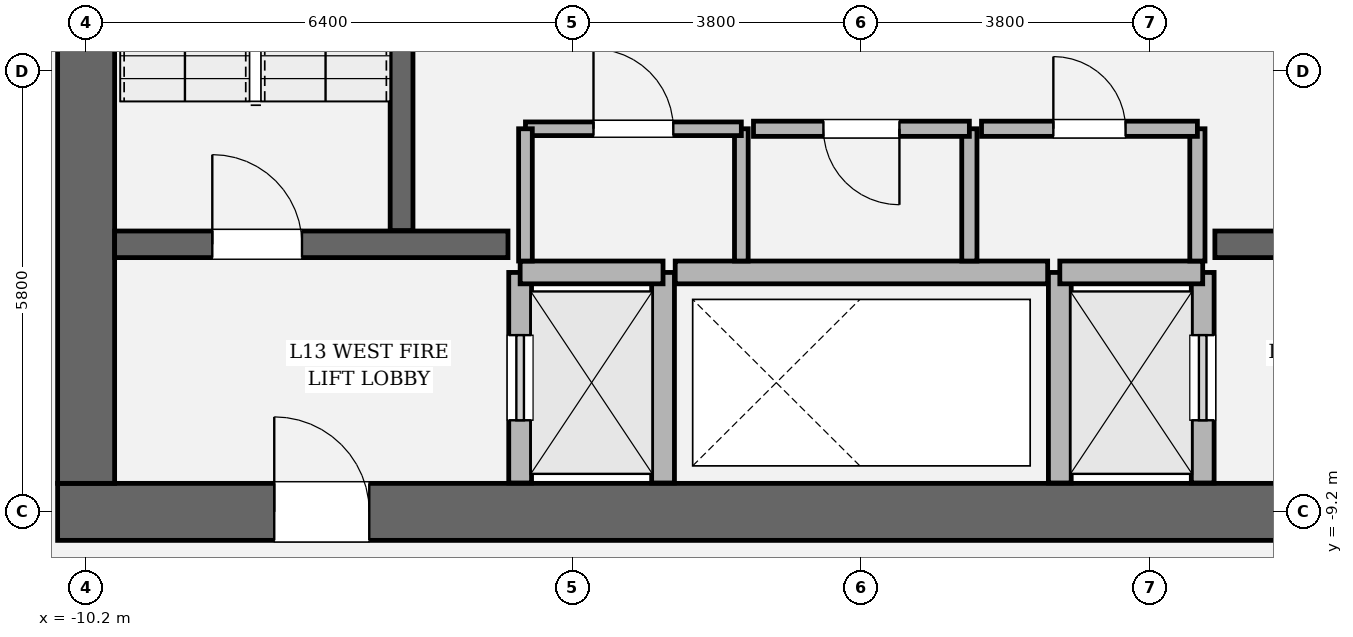
"""IFC4 building model, lengths in metres.
Left out: names, types, materials, properties, quantities, classifications, styles, units other than length and angle.
Written with IfcOpenShell. Run it as: python <this file> out.ifc"""

import sys

from ifc_helpers import new_model, si_unit, direction, frame, frame_2d, origin, place, context, subcontext, project, spatial, rectangle, extrude, element, fill, save


model = new_model("IFC4")
c1 = context("Model", 3, precision=1e-05, world=origin(), true_north=direction((0.0, 1.0)))
c2 = subcontext(c1, "Body", "Model", "MODEL_VIEW")
j1 = project(units=[si_unit("LENGTHUNIT", "METRE"), si_unit("PLANEANGLEUNIT", "RADIAN")], contexts=[c1])
p1 = place(None, origin())
s1 = spatial("IfcSite", under=j1, at=p1, CompositionType="ELEMENT")
p2 = place(p1, origin())
s2 = spatial("IfcBuilding", under=s1, at=p2, CompositionType="ELEMENT")
p3 = place(p2, frame((0.0, 0.0, 60.6)))
s3 = spatial("IfcBuildingStorey", under=s2, at=p3, CompositionType="ELEMENT", Elevation=60.6)
p4 = place(p3, frame((10.575, -9.2, 0.0), z_axis=(0.0, 0.0, 1.0), x_axis=(-1.0, 0.0, 0.0)))
e1 = element("IfcWall", 1, at=p4, inside=s3, PredefinedType="SHEAR", context=c2, shape_type="SweptSolid", body=[
    extrude(rectangle(XDim=21.15, YDim=0.75, at=frame_2d((10.575, 0.0))), origin(), (0.0, 0.0, 1.0), 4.05),
])
p5 = place(p4, frame((2.85, 0.0, 0.0)))
e2 = element("IfcOpeningElement", 2, at=p5, cuts=e1, PredefinedType="OPENING", context=c2, shape_type="SweptSolid", body=[
    extrude(rectangle(XDim=1.25, YDim=2.25, at=frame_2d((0.625, 1.125))), frame((0.0, 0.385, 0.0), z_axis=(0.0, -1.0, 0.0), x_axis=(1.0, 0.0, 0.0)), (0.0, 0.0, 1.0), 0.77),
])
p6 = place(p4, frame((17.05, 0.0, 0.0)))
e3 = element("IfcOpeningElement", 3, at=p6, cuts=e1, PredefinedType="OPENING", context=c2, shape_type="SweptSolid", body=[
    extrude(rectangle(XDim=1.25, YDim=2.25, at=frame_2d((0.625, 1.125))), frame((0.0, 0.385, 0.0), z_axis=(0.0, -1.0, 0.0), x_axis=(1.0, 0.0, 0.0)), (0.0, 0.0, 1.0), 0.77),
])
p7 = place(p3, frame((-10.2, -8.825, 0.0), z_axis=(0.0, 0.0, 1.0), x_axis=(0.0, 1.0, 0.0)))
e4 = element("IfcWall", 4, at=p7, inside=s3, PredefinedType="SHEAR", context=c2, shape_type="SweptSolid", body=[
    extrude(rectangle(XDim=17.65, YDim=0.75, at=frame_2d((8.825, 0.0))), origin(), (0.0, 0.0, 1.0), 4.05),
])
p8 = place(p7, frame((12.615, 0.0, 0.0)))
e5 = element("IfcOpeningElement", 5, at=p8, cuts=e4, PredefinedType="OPENING", context=c2, shape_type="SweptSolid", body=[
    extrude(rectangle(XDim=1.18, YDim=2.2, at=frame_2d((0.59, 1.1))), frame((0.0, 0.385, 0.0), z_axis=(0.0, -1.0, 0.0), x_axis=(1.0, 0.0, 0.0)), (0.0, 0.0, 1.0), 0.77),
])
p9 = place(p3, frame((-6.05, -5.5, 0.0), z_axis=(0.0, 0.0, 1.0), x_axis=(0.0, 1.0, 0.0)))
e6 = element("IfcWall", 6, at=p9, inside=s3, PredefinedType="SOLIDWALL", context=c2, shape_type="SweptSolid", body=[
    extrude(rectangle(XDim=8.95, YDim=0.3, at=frame_2d((4.475, 0.0))), origin(), (0.0, 0.0, 1.0), 4.05),
])
p10 = place(p3, frame((-9.825, -5.68, 0.0), z_axis=(0.0, 0.0, 1.0), x_axis=(1.0, 0.0, 0.0)))
e7 = element("IfcWall", 7, at=p10, inside=s3, PredefinedType="SOLIDWALL", context=c2, shape_type="SweptSolid", body=[
    extrude(rectangle(XDim=5.175, YDim=0.35, at=frame_2d((2.587, 0.0))), origin(), (0.0, 0.0, 1.0), 4.05),
])
p11 = place(p10, frame((1.285, 0.0, 0.0)))
e8 = element("IfcOpeningElement", 8, at=p11, cuts=e7, PredefinedType="OPENING", context=c2, shape_type="SweptSolid", body=[
    extrude(rectangle(XDim=1.18, YDim=2.2, at=frame_2d((0.59, 1.1))), frame((0.0, 0.185, 0.0), z_axis=(0.0, -1.0, 0.0), x_axis=(1.0, 0.0, 0.0)), (0.0, 0.0, 1.0), 0.37),
])
p12 = place(p3, frame((4.65, -5.68, 0.0), z_axis=(0.0, 0.0, 1.0), x_axis=(1.0, 0.0, 0.0)))
e9 = element("IfcWall", 9, at=p12, inside=s3, PredefinedType="SOLIDWALL", context=c2, shape_type="SweptSolid", body=[
    extrude(rectangle(XDim=5.175, YDim=0.35, at=frame_2d((2.587, 0.0))), origin(), (0.0, 0.0, 1.0), 4.05),
])
p13 = place(p12, frame((2.71, 0.0, 0.0)))
e10 = element("IfcOpeningElement", 10, at=p13, cuts=e9, PredefinedType="OPENING", context=c2, shape_type="SweptSolid", body=[
    extrude(rectangle(XDim=1.18, YDim=2.2, at=frame_2d((0.59, 1.1))), frame((0.0, 0.185, 0.0), z_axis=(0.0, -1.0, 0.0), x_axis=(1.0, 0.0, 0.0)), (0.0, 0.0, 1.0), 0.37),
])
p14 = place(p3, frame((-4.49, -8.82, 0.0), z_axis=(0.0, 0.0, 1.0), x_axis=(0.0, 1.0, 0.0)))
e11 = element("IfcWall", 11, at=p14, inside=s3, PredefinedType="SOLIDWALL", context=c2, shape_type="SweptSolid", body=[
    extrude(rectangle(XDim=2.77, YDim=0.3, at=frame_2d((1.385, 0.0))), origin(), (0.0, 0.0, 1.0), 3.81),
])
p15 = place(p14, frame((0.825, 0.0, 0.0)))
e12 = element("IfcOpeningElement", 12, at=p15, cuts=e11, PredefinedType="OPENING", context=c2, shape_type="SweptSolid", body=[
    extrude(rectangle(XDim=1.12, YDim=2.25, at=frame_2d((0.56, 1.125))), frame((0.0, 0.16, 0.0), z_axis=(0.0, -1.0, 0.0), x_axis=(1.0, 0.0, 0.0)), (0.0, 0.0, 1.0), 0.32),
])
p16 = place(p3, frame((-2.61, -8.82, 0.0), z_axis=(0.0, 0.0, 1.0), x_axis=(0.0, 1.0, 0.0)))
e13 = element("IfcWall", 13, at=p16, inside=s3, PredefinedType="SOLIDWALL", context=c2, shape_type="SweptSolid", body=[
    extrude(rectangle(XDim=2.77, YDim=0.3, at=frame_2d((1.385, 0.0))), origin(), (0.0, 0.0, 1.0), 3.81),
])
p17 = place(p3, frame((-4.49, -6.05, 0.0), z_axis=(0.0, 0.0, 1.0), x_axis=(1.0, 0.0, 0.0)))
e14 = element("IfcWall", 14, at=p17, inside=s3, PredefinedType="SOLIDWALL", context=c2, shape_type="SweptSolid", body=[
    extrude(rectangle(XDim=1.88, YDim=0.3, at=frame_2d((0.94, 0.0))), origin(), (0.0, 0.0, 1.0), 3.81),
])
p18 = place(p3, frame((4.49, -8.82, 0.0), z_axis=(0.0, 0.0, 1.0), x_axis=(0.0, 1.0, 0.0)))
e15 = element("IfcWall", 15, at=p18, inside=s3, PredefinedType="SOLIDWALL", context=c2, shape_type="SweptSolid", body=[
    extrude(rectangle(XDim=2.77, YDim=0.3, at=frame_2d((1.385, 0.0))), origin(), (0.0, 0.0, 1.0), 3.81),
])
p19 = place(p18, frame((0.825, 0.0, 0.0)))
e16 = element("IfcOpeningElement", 16, at=p19, cuts=e15, PredefinedType="OPENING", context=c2, shape_type="SweptSolid", body=[
    extrude(rectangle(XDim=1.12, YDim=2.25, at=frame_2d((0.56, 1.125))), frame((0.0, 0.16, 0.0), z_axis=(0.0, -1.0, 0.0), x_axis=(1.0, 0.0, 0.0)), (0.0, 0.0, 1.0), 0.32),
])
p20 = place(p3, frame((2.61, -8.82, 0.0), z_axis=(0.0, 0.0, 1.0), x_axis=(0.0, 1.0, 0.0)))
e17 = element("IfcWall", 17, at=p20, inside=s3, PredefinedType="SOLIDWALL", context=c2, shape_type="SweptSolid", body=[
    extrude(rectangle(XDim=2.77, YDim=0.3, at=frame_2d((1.385, 0.0))), origin(), (0.0, 0.0, 1.0), 3.81),
])
p21 = place(p3, frame((2.61, -6.05, 0.0), z_axis=(0.0, 0.0, 1.0), x_axis=(1.0, 0.0, 0.0)))
e18 = element("IfcWall", 18, at=p21, inside=s3, PredefinedType="SOLIDWALL", context=c2, shape_type="SweptSolid", body=[
    extrude(rectangle(XDim=1.88, YDim=0.3, at=frame_2d((0.94, 0.0))), origin(), (0.0, 0.0, 1.0), 3.81),
])
p22 = place(p3, frame((-2.45, -6.05, 0.0), z_axis=(0.0, 0.0, 1.0), x_axis=(1.0, 0.0, 0.0)))
e19 = element("IfcWall", 19, at=p22, inside=s3, PredefinedType="SOLIDWALL", context=c2, shape_type="SweptSolid", body=[
    extrude(rectangle(XDim=4.9, YDim=0.3, at=frame_2d((2.45, 0.0))), origin(), (0.0, 0.0, 1.0), 3.81),
])
p23 = place(p3, frame((-1.58, -5.9, 0.0), z_axis=(0.0, 0.0, 1.0), x_axis=(0.0, 1.0, 0.0)))
e20 = element("IfcWall", 20, at=p23, inside=s3, PredefinedType="PARTITIONING", context=c2, shape_type="SweptSolid", body=[
    extrude(rectangle(XDim=1.74, YDim=0.18, at=frame_2d((0.87, 0.0))), origin(), (0.0, 0.0, 1.0), 3.81),
])
p24 = place(p3, frame((-1.58, -4.16, 0.0), z_axis=(0.0, 0.0, 1.0), x_axis=(-1.0, 0.0, 0.0)))
e21 = element("IfcWall", 21, at=p24, inside=s3, PredefinedType="PARTITIONING", context=c2, shape_type="SweptSolid", body=[
    extrude(rectangle(XDim=2.84, YDim=0.18, at=frame_2d((1.42, 0.0))), origin(), (0.0, 0.0, 1.0), 3.81),
])
p25 = place(p24, frame((0.895, 0.0, 0.0)))
e22 = element("IfcOpeningElement", 22, at=p25, cuts=e21, PredefinedType="OPENING", context=c2, shape_type="SweptSolid", body=[
    extrude(rectangle(XDim=1.05, YDim=2.2, at=frame_2d((0.525, 1.1))), frame((0.0, 0.1, 0.0), z_axis=(0.0, -1.0, 0.0), x_axis=(1.0, 0.0, 0.0)), (0.0, 0.0, 1.0), 0.2),
])
p26 = place(p3, frame((-4.42, -4.16, 0.0), z_axis=(0.0, 0.0, 1.0), x_axis=(0.0, -1.0, 0.0)))
e23 = element("IfcWall", 23, at=p26, inside=s3, PredefinedType="PARTITIONING", context=c2, shape_type="SweptSolid", body=[
    extrude(rectangle(XDim=1.74, YDim=0.18, at=frame_2d((0.87, 0.0))), origin(), (0.0, 0.0, 1.0), 3.81),
])
p27 = place(p3, frame((1.42, -5.9, 0.0), z_axis=(0.0, 0.0, 1.0), x_axis=(0.0, 1.0, 0.0)))
e24 = element("IfcWall", 24, at=p27, inside=s3, PredefinedType="SOLIDWALL", context=c2, shape_type="SweptSolid", body=[
    extrude(rectangle(XDim=1.74, YDim=0.2, at=frame_2d((0.87, 0.0))), origin(), (0.0, 0.0, 1.0), 3.81),
])
p28 = place(p3, frame((1.42, -4.16, 0.0), z_axis=(0.0, 0.0, 1.0), x_axis=(-1.0, 0.0, 0.0)))
e25 = element("IfcWall", 25, at=p28, inside=s3, PredefinedType="SOLIDWALL", context=c2, shape_type="SweptSolid", body=[
    extrude(rectangle(XDim=2.84, YDim=0.2, at=frame_2d((1.42, 0.0))), origin(), (0.0, 0.0, 1.0), 3.81),
])
p29 = place(p28, frame((0.92, 0.0, 0.0)))
e26 = element("IfcOpeningElement", 26, at=p29, cuts=e25, PredefinedType="OPENING", context=c2, shape_type="SweptSolid", body=[
    extrude(rectangle(XDim=1.0, YDim=2.15, at=frame_2d((0.5, 1.075))), frame((0.0, 0.11, 0.0), z_axis=(0.0, -1.0, 0.0), x_axis=(1.0, 0.0, 0.0)), (0.0, 0.0, 1.0), 0.22),
])
p30 = place(p3, frame((4.42, -5.9, 0.0), z_axis=(0.0, 0.0, 1.0), x_axis=(0.0, 1.0, 0.0)))
e27 = element("IfcWall", 27, at=p30, inside=s3, PredefinedType="SOLIDWALL", context=c2, shape_type="SweptSolid", body=[
    extrude(rectangle(XDim=1.74, YDim=0.2, at=frame_2d((0.87, 0.0))), origin(), (0.0, 0.0, 1.0), 3.81),
])
p31 = place(p3, frame((4.42, -4.16, 0.0), z_axis=(0.0, 0.0, 1.0), x_axis=(-1.0, 0.0, 0.0)))
e28 = element("IfcWall", 28, at=p31, inside=s3, PredefinedType="SOLIDWALL", context=c2, shape_type="SweptSolid", body=[
    extrude(rectangle(XDim=2.84, YDim=0.2, at=frame_2d((1.42, 0.0))), origin(), (0.0, 0.0, 1.0), 3.81),
])
p32 = place(p31, frame((0.945, 0.0, 0.0)))
e29 = element("IfcOpeningElement", 29, at=p32, cuts=e28, PredefinedType="OPENING", context=c2, shape_type="SweptSolid", body=[
    extrude(rectangle(XDim=0.95, YDim=2.15, at=frame_2d((0.475, 1.075))), frame((0.0, 0.11, 0.0), z_axis=(0.0, -1.0, 0.0), x_axis=(1.0, 0.0, 0.0)), (0.0, 0.0, 1.0), 0.22),
])
p33 = place(p11, origin())
e30 = element("IfcDoor", 30, at=p33, inside=s3, OperationType="SINGLE_SWING_LEFT", PredefinedType="DOOR", context=c2, shape_type="SweptSolid", body=[
    extrude(rectangle(XDim=1.18, YDim=2.2, at=frame_2d((0.59, 1.1))), frame((0.0, 0.025, 0.0), z_axis=(0.0, -1.0, 0.0), x_axis=(1.0, 0.0, 0.0)), (0.0, 0.0, 1.0), 0.05),
])
fill(e8, e30)
p34 = place(p6, origin())
e31 = element("IfcDoor", 31, at=p34, inside=s3, OperationType="SINGLE_SWING_RIGHT", PredefinedType="DOOR", context=c2, shape_type="SweptSolid", body=[
    extrude(rectangle(XDim=1.25, YDim=2.25, at=frame_2d((0.625, 1.125))), frame((0.0, 0.025, 0.0), z_axis=(0.0, -1.0, 0.0), x_axis=(1.0, 0.0, 0.0)), (0.0, 0.0, 1.0), 0.05),
])
fill(e3, e31)
p35 = place(p15, origin())
e32 = element("IfcDoor", 32, at=p35, inside=s3, OperationType="SLIDING_TO_LEFT", PredefinedType="DOOR", context=c2, shape_type="SweptSolid", body=[
    extrude(rectangle(XDim=1.12, YDim=2.25, at=frame_2d((0.56, 1.125))), frame((0.0, 0.025, 0.0), z_axis=(0.0, -1.0, 0.0), x_axis=(1.0, 0.0, 0.0)), (0.0, 0.0, 1.0), 0.05),
])
fill(e12, e32)
p36 = place(p19, origin())
e33 = element("IfcDoor", 33, at=p36, inside=s3, OperationType="SLIDING_TO_RIGHT", PredefinedType="DOOR", context=c2, shape_type="SweptSolid", body=[
    extrude(rectangle(XDim=1.12, YDim=2.25, at=frame_2d((0.56, 1.125))), frame((0.0, 0.025, 0.0), z_axis=(0.0, -1.0, 0.0), x_axis=(1.0, 0.0, 0.0)), (0.0, 0.0, 1.0), 0.05),
])
fill(e16, e33)
p37 = place(p25, origin())
e34 = element("IfcDoor", 34, at=p37, inside=s3, OperationType="SINGLE_SWING_RIGHT", PredefinedType="DOOR", context=c2, shape_type="SweptSolid", body=[
    extrude(rectangle(XDim=1.05, YDim=2.2, at=frame_2d((0.525, 1.1))), frame((0.0, 0.025, 0.0), z_axis=(0.0, -1.0, 0.0), x_axis=(1.0, 0.0, 0.0)), (0.0, 0.0, 1.0), 0.05),
])
fill(e22, e34)
p38 = place(p29, origin())
e35 = element("IfcDoor", 35, at=p38, inside=s3, OperationType="SINGLE_SWING_LEFT", PredefinedType="DOOR", context=c2, shape_type="SweptSolid", body=[
    extrude(rectangle(XDim=1.0, YDim=2.15, at=frame_2d((0.5, 1.075))), frame((0.0, 0.025, 0.0), z_axis=(0.0, -1.0, 0.0), x_axis=(1.0, 0.0, 0.0)), (0.0, 0.0, 1.0), 0.05),
])
fill(e26, e35)
p39 = place(p32, origin())
e36 = element("IfcDoor", 36, at=p39, inside=s3, OperationType="SINGLE_SWING_RIGHT", PredefinedType="DOOR", context=c2, shape_type="SweptSolid", body=[
    extrude(rectangle(XDim=0.95, YDim=2.15, at=frame_2d((0.475, 1.075))), frame((0.0, 0.025, 0.0), z_axis=(0.0, -1.0, 0.0), x_axis=(1.0, 0.0, 0.0)), (0.0, 0.0, 1.0), 0.05),
])
fill(e29, e36)
save(model, sys.argv[1])
